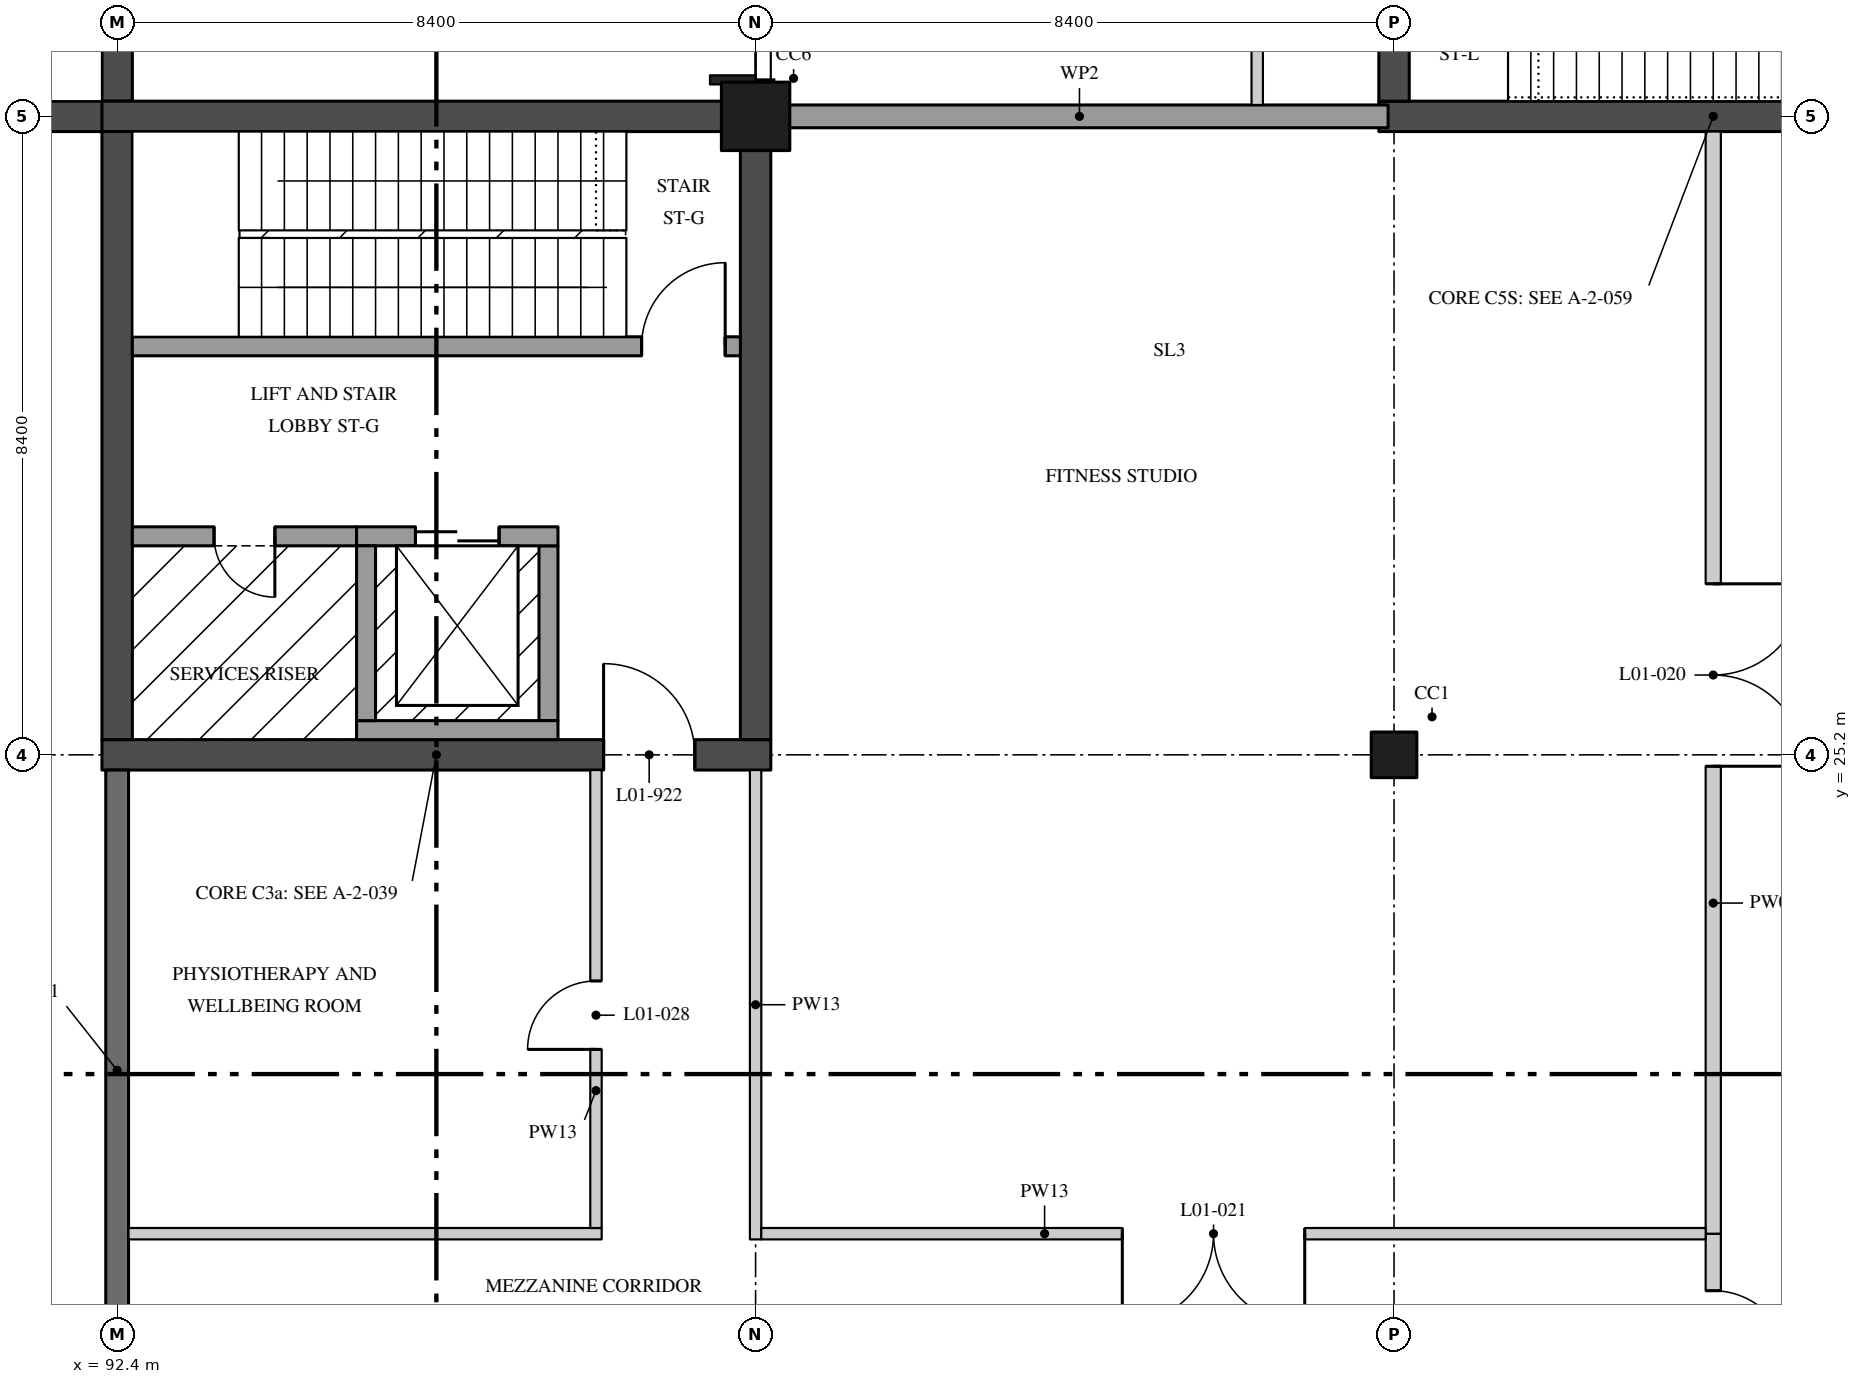
"""IFC4 building model, lengths in metres.
Left out: names, types, materials, properties, quantities, classifications, styles, units other than length and angle.
Written with IfcOpenShell. Run it as: python <this file> out.ifc"""

import sys

from ifc_helpers import new_model, si_unit, direction, frame, frame_2d, origin, origin_2d, place, context, subcontext, project, spatial, polyline, rectangle, outline, extrude, element, fill, save


model = new_model("IFC4")
c1 = context("Model", 3, precision=1e-05, world=origin(), true_north=direction((0.0, 1.0)))
c2 = subcontext(c1, "Body", "Model", "MODEL_VIEW")
j1 = project(units=[si_unit("LENGTHUNIT", "METRE"), si_unit("PLANEANGLEUNIT", "RADIAN")], contexts=[c1])
p1 = place(None, origin())
s1 = spatial("IfcSite", under=j1, at=p1, CompositionType="ELEMENT")
p2 = place(p1, origin())
s2 = spatial("IfcBuilding", under=s1, at=p2, CompositionType="ELEMENT")
p3 = place(p2, frame((0.0, 0.0, 5.4)))
s3 = spatial("IfcBuildingStorey", under=s2, at=p3, CompositionType="ELEMENT", Elevation=5.4)
p4 = place(p3, frame((100.8, 33.6, 3.0), z_axis=(0.0, 0.0, 1.0), x_axis=(1.0, 0.0, 0.0)))
e1 = element("IfcColumn", 1, at=p4, inside=s3, PredefinedType="COLUMN", context=c2, shape_type="SweptSolid", body=[
    extrude(rectangle(XDim=0.9, YDim=0.9, at=origin_2d()), origin(), (0.0, 0.0, 1.0), 1.37),
])
p5 = place(p3, frame((109.2, 25.2, 0.0), z_axis=(0.0, 0.0, 1.0), x_axis=(1.0, 0.0, 0.0)))
e2 = element("IfcColumn", 2, at=p5, inside=s3, PredefinedType="COLUMN", context=c2, shape_type="SweptSolid", body=[
    extrude(rectangle(XDim=0.6, YDim=0.6, at=origin_2d()), origin(), (0.0, 0.0, 1.0), 3.0),
])
p6 = place(p3, frame((83.8, 33.6, 0.0), z_axis=(0.0, 0.0, 1.0), x_axis=(1.0, 0.0, 0.0)))
e3 = element("IfcWall", 3, at=p6, inside=s3, PredefinedType="SHEAR", context=c2, shape_type="SweptSolid", body=[
    extrude(rectangle(XDim=8.8, YDim=0.4, at=frame_2d((4.4, 0.0))), origin(), (0.0, 0.0, 1.0), 4.25),
])
p7 = place(p3, frame((92.4, 33.8, 0.0), z_axis=(0.0, 0.0, 1.0), x_axis=(0.0, 1.0, 0.0)))
e4 = element("IfcWall", 4, at=p7, inside=s3, PredefinedType="SHEAR", context=c2, shape_type="SweptSolid", body=[
    extrude(rectangle(XDim=8.0, YDim=0.4, at=frame_2d((4.0, 0.0))), origin(), (0.0, 0.0, 1.0), 4.25),
])
p8 = place(p3, frame((92.2, 25.2, 0.0), z_axis=(0.0, 0.0, 1.0), x_axis=(1.0, 0.0, 0.0)))
e5 = element("IfcWall", 5, at=p8, inside=s3, PredefinedType="SHEAR", context=c2, shape_type="SweptSolid", body=[
    extrude(rectangle(XDim=8.8, YDim=0.4, at=frame_2d((4.4, 0.0))), origin(), (0.0, 0.0, 1.0), 3.0),
])
p9 = place(p8, frame((6.6, 0.0, 0.0)))
e6 = element("IfcOpeningElement", 6, at=p9, cuts=e5, PredefinedType="OPENING", context=c2, shape_type="SweptSolid", body=[
    extrude(rectangle(XDim=1.2, YDim=2.1, at=frame_2d((0.6, 1.05))), frame((0.0, 0.21, 0.0), z_axis=(0.0, -1.0, 0.0), x_axis=(1.0, 0.0, 0.0)), (0.0, 0.0, 1.0), 0.42),
])
p10 = place(p3, frame((92.2, 33.6, 0.0), z_axis=(0.0, 0.0, 1.0), x_axis=(1.0, 0.0, 0.0)))
e7 = element("IfcWall", 7, at=p10, inside=s3, PredefinedType="SHEAR", context=c2, shape_type="SweptSolid", body=[
    extrude(rectangle(XDim=8.8, YDim=0.4, at=frame_2d((4.4, 0.0))), origin(), (0.0, 0.0, 1.0), 3.0),
])
for number, where, z_axis, x_axis in (
    (8, (92.4, 25.4, 0.0), (0.0, 0.0, 1.0), (0.0, 1.0, 0.0)),
    (9, (100.8, 25.4, 0.0), (0.0, 0.0, 1.0), (0.0, 1.0, 0.0)),
):
    element("IfcWall", number, at=place(p3, frame(where, z_axis=z_axis, x_axis=x_axis)), inside=s3, PredefinedType="SHEAR", context=c2, shape_type="SweptSolid", body=[
        extrude(rectangle(XDim=8.0, YDim=0.4, at=frame_2d((4.0, 0.0))), origin(), (0.0, 0.0, 1.0), 3.0),
    ])
p11 = place(p3, frame((100.6, 30.575, 0.0), z_axis=(0.0, 0.0, 1.0), x_axis=(-1.0, 0.0, 0.0)))
e10 = element("IfcWall", 10, at=p11, inside=s3, PredefinedType="SOLIDWALL", context=c2, shape_type="SweptSolid", body=[
    extrude(rectangle(XDim=8.0, YDim=0.25, at=frame_2d((4.0, 0.0))), origin(), (0.0, 0.0, 1.0), 3.0),
])
p12 = place(p11, frame((0.2, 0.0, 0.0)))
e11 = element("IfcOpeningElement", 11, at=p12, cuts=e10, PredefinedType="OPENING", context=c2, shape_type="SweptSolid", body=[
    extrude(rectangle(XDim=1.1, YDim=2.1, at=frame_2d((0.55, 1.05))), frame((0.0, 0.135, 0.0), z_axis=(0.0, -1.0, 0.0), x_axis=(1.0, 0.0, 0.0)), (0.0, 0.0, 1.0), 0.27),
])
p13 = place(p3, frame((95.55, 28.075, 0.0), z_axis=(0.0, 0.0, 1.0), x_axis=(-1.0, 0.0, 0.0)))
e12 = element("IfcWall", 12, at=p13, inside=s3, PredefinedType="SOLIDWALL", context=c2, shape_type="SweptSolid", body=[
    extrude(rectangle(XDim=2.95, YDim=0.25, at=frame_2d((1.475, 0.0))), origin(), (0.0, 0.0, 1.0), 3.0),
])
p14 = place(p13, frame((1.075, 0.0, 0.0)))
e13 = element("IfcOpeningElement", 13, at=p14, cuts=e12, PredefinedType="OPENING", context=c2, shape_type="SweptSolid", body=[
    extrude(rectangle(XDim=0.8, YDim=2.1, at=frame_2d((0.4, 1.05))), frame((0.0, 0.135, 0.0), z_axis=(0.0, -1.0, 0.0), x_axis=(1.0, 0.0, 0.0)), (0.0, 0.0, 1.0), 0.27),
])
p15 = place(p3, frame((109.0, 33.6, 0.0), z_axis=(0.0, 0.0, 1.0), x_axis=(1.0, 0.0, 0.0)))
e14 = element("IfcWall", 14, at=p15, inside=s3, PredefinedType="SHEAR", context=c2, shape_type="SweptSolid", body=[
    extrude(rectangle(XDim=8.8, YDim=0.4, at=frame_2d((4.4, 0.0))), origin(), (0.0, 0.0, 1.0), 4.37),
])
p16 = place(p3, frame((109.2, 33.8, 0.0), z_axis=(0.0, 0.0, 1.0), x_axis=(0.0, 1.0, 0.0)))
e15 = element("IfcWall", 15, at=p16, inside=s3, PredefinedType="SHEAR", context=c2, shape_type="SweptSolid", body=[
    extrude(rectangle(XDim=8.0, YDim=0.4, at=frame_2d((4.0, 0.0))), origin(), (0.0, 0.0, 1.0), 4.37),
])
p17 = place(p16, frame((3.875, 0.0, 0.0)))
e16 = element("IfcOpeningElement", 16, at=p17, cuts=e15, PredefinedType="OPENING", context=c2, shape_type="SweptSolid", body=[
    extrude(rectangle(XDim=1.2, YDim=2.1, at=frame_2d((0.6, 1.05))), frame((0.0, 0.21, 0.0), z_axis=(0.0, -1.0, 0.0), x_axis=(1.0, 0.0, 0.0)), (0.0, 0.0, 1.0), 0.42),
])
p18 = place(p3, frame((98.075, 25.65, 0.0), z_axis=(0.0, 0.0, 1.0), x_axis=(0.0, 1.0, 0.0)))
e17 = element("IfcWall", 17, at=p18, inside=s3, PredefinedType="SOLIDWALL", context=c2, shape_type="SweptSolid", body=[
    extrude(rectangle(XDim=2.3, YDim=0.25, at=frame_2d((1.15, 0.0))), origin(), (0.0, 0.0, 1.0), 3.0),
])
p19 = place(p3, frame((95.55, 28.075, 0.0), z_axis=(0.0, 0.0, 1.0), x_axis=(1.0, 0.0, 0.0)))
e18 = element("IfcWall", 18, at=p19, inside=s3, PredefinedType="SOLIDWALL", context=c2, shape_type="SweptSolid", body=[
    extrude(rectangle(XDim=2.65, YDim=0.25, at=frame_2d((1.325, 0.0))), origin(), (0.0, 0.0, 1.0), 3.0),
])
p20 = place(p19, frame((0.775, 0.0, 0.0)))
e19 = element("IfcOpeningElement", 19, at=p20, cuts=e18, PredefinedType="OPENING", context=c2, shape_type="SweptSolid", body=[
    extrude(rectangle(XDim=1.1, YDim=2.1, at=frame_2d((0.55, 1.05))), frame((0.0, 0.135, 0.0), z_axis=(0.0, -1.0, 0.0), x_axis=(1.0, 0.0, 0.0)), (0.0, 0.0, 1.0), 0.27),
])
p21 = place(p3, frame((95.55, 25.525, 0.0), z_axis=(0.0, 0.0, 1.0), x_axis=(1.0, 0.0, 0.0)))
e20 = element("IfcWall", 20, at=p21, inside=s3, PredefinedType="SOLIDWALL", context=c2, shape_type="SweptSolid", body=[
    extrude(rectangle(XDim=2.65, YDim=0.25, at=frame_2d((1.325, 0.0))), origin(), (0.0, 0.0, 1.0), 3.0),
])
p22 = place(p3, frame((95.675, 25.65, 0.0), z_axis=(0.0, 0.0, 1.0), x_axis=(0.0, 1.0, 0.0)))
e21 = element("IfcWall", 21, at=p22, inside=s3, PredefinedType="SOLIDWALL", context=c2, shape_type="SweptSolid", body=[
    extrude(rectangle(XDim=2.3, YDim=0.25, at=frame_2d((1.15, 0.0))), origin(), (0.0, 0.0, 1.0), 3.0),
])
p23 = place(p3, frame((113.4, 17.0, 0.0), z_axis=(0.0, 0.0, 1.0), x_axis=(0.0, 1.0, 0.0)))
e22 = element("IfcWall", 22, at=p23, inside=s3, PredefinedType="PARTITIONING", context=c2, shape_type="SweptSolid", body=[
    extrude(rectangle(XDim=1.9, YDim=0.2, at=frame_2d((0.95, 0.0))), origin(), (0.0, 0.0, 1.0), 4.37),
])
p24 = place(p23, frame((0.15, 0.0, 0.0)))
e23 = element("IfcOpeningElement", 23, at=p24, cuts=e22, PredefinedType="OPENING", context=c2, shape_type="SweptSolid", body=[
    extrude(rectangle(XDim=1.0, YDim=2.4, at=frame_2d((0.5, 1.2))), frame((0.0, 0.11, 0.0), z_axis=(0.0, -1.0, 0.0), x_axis=(1.0, 0.0, 0.0)), (0.0, 0.0, 1.0), 0.22),
])
p25 = place(p3, frame((113.4, 18.9, 0.0), z_axis=(0.0, 0.0, 1.0), x_axis=(0.0, 1.0, 0.0)))
e24 = element("IfcWall", 24, at=p25, inside=s3, PredefinedType="PARTITIONING", context=c2, shape_type="SweptSolid", body=[
    extrude(rectangle(XDim=14.5, YDim=0.2, at=frame_2d((7.25, 0.0))), origin(), (0.0, 0.0, 1.0), 4.37),
])
p26 = place(p25, frame((6.15, 0.0, 0.0)))
e25 = element("IfcOpeningElement", 25, at=p26, cuts=e24, PredefinedType="OPENING", context=c2, shape_type="SweptSolid", body=[
    extrude(rectangle(XDim=2.4, YDim=2.7, at=frame_2d((1.2, 1.35))), frame((0.0, 0.11, 0.0), z_axis=(0.0, -1.0, 0.0), x_axis=(1.0, 0.0, 0.0)), (0.0, 0.0, 1.0), 0.22),
])
p27 = place(p3, frame((100.8, 18.825, 0.0), z_axis=(0.0, 0.0, 1.0), x_axis=(0.0, 1.0, 0.0)))
e26 = element("IfcWall", 26, at=p27, inside=s3, PredefinedType="PARTITIONING", context=c2, shape_type="SweptSolid", body=[
    extrude(rectangle(XDim=6.175, YDim=0.15, at=frame_2d((3.087, 0.0))), origin(), (0.0, 0.0, 1.0), 2.975),
])
p28 = place(p3, frame((100.875, 18.9, 0.0), z_axis=(0.0, 0.0, 1.0), x_axis=(1.0, 0.0, 0.0)))
e27 = element("IfcWall", 27, at=p28, inside=s3, PredefinedType="PARTITIONING", context=c2, shape_type="SweptSolid", body=[
    extrude(rectangle(XDim=12.425, YDim=0.15, at=frame_2d((6.212, 0.0))), origin(), (0.0, 0.0, 1.0), 4.37),
])
p29 = place(p28, frame((4.75, 0.0, 0.0)))
e28 = element("IfcOpeningElement", 28, at=p29, cuts=e27, PredefinedType="OPENING", context=c2, shape_type="SweptSolid", body=[
    extrude(rectangle(XDim=2.4, YDim=2.7, at=frame_2d((1.2, 1.35))), frame((0.0, 0.085, 0.0), z_axis=(0.0, -1.0, 0.0), x_axis=(1.0, 0.0, 0.0)), (0.0, 0.0, 1.0), 0.17),
])
p30 = place(p3, frame((92.55, 18.9, 0.0), z_axis=(0.0, 0.0, 1.0), x_axis=(1.0, 0.0, 0.0)))
e29 = element("IfcWall", 29, at=p30, inside=s3, PredefinedType="PARTITIONING", context=c2, shape_type="SweptSolid", body=[
    extrude(rectangle(XDim=6.225, YDim=0.15, at=frame_2d((3.112, 0.0))), origin(), (0.0, 0.0, 1.0), 4.37),
])
p31 = place(p3, frame((98.7, 18.975, 0.0), z_axis=(0.0, 0.0, 1.0), x_axis=(0.0, 1.0, 0.0)))
e30 = element("IfcWall", 30, at=p31, inside=s3, PredefinedType="PARTITIONING", context=c2, shape_type="SweptSolid", body=[
    extrude(rectangle(XDim=6.025, YDim=0.15, at=frame_2d((3.012, 0.0))), origin(), (0.0, 0.0, 1.0), 4.37),
])
p32 = place(p31, frame((2.35, 0.0, 0.0)))
e31 = element("IfcOpeningElement", 31, at=p32, cuts=e30, PredefinedType="OPENING", context=c2, shape_type="SweptSolid", body=[
    extrude(rectangle(XDim=0.9, YDim=2.1, at=frame_2d((0.45, 1.05))), frame((0.0, 0.085, 0.0), z_axis=(0.0, -1.0, 0.0), x_axis=(1.0, 0.0, 0.0)), (0.0, 0.0, 1.0), 0.17),
])
p33 = place(p3, frame((107.4, 33.75, 0.0), z_axis=(0.0, 0.0, 1.0), x_axis=(0.0, 1.0, 0.0)))
e32 = element("IfcWall", 32, at=p33, inside=s3, PredefinedType="PARTITIONING", context=c2, shape_type="SweptSolid", body=[
    extrude(rectangle(XDim=8.02, YDim=0.15, at=frame_2d((4.01, 0.0))), origin(), (0.0, 0.0, 1.0), 4.37),
])
p34 = place(p33, frame((4.25, 0.0, 0.0)))
e33 = element("IfcOpeningElement", 33, at=p34, cuts=e32, PredefinedType="OPENING", context=c2, shape_type="SweptSolid", body=[
    extrude(rectangle(XDim=1.35, YDim=2.1, at=frame_2d((0.675, 1.05))), frame((0.0, 0.085, 0.0), z_axis=(0.0, -1.0, 0.0), x_axis=(1.0, 0.0, 0.0)), (0.0, 0.0, 1.0), 0.17),
])
p35 = place(p3, frame((92.4, 25.0, 0.0), z_axis=(0.0, 0.0, 1.0), x_axis=(0.0, -1.0, 0.0)))
e34 = element("IfcWall", 34, at=p35, inside=s3, PredefinedType="SOLIDWALL", context=c2, shape_type="SweptSolid", body=[
    extrude(rectangle(XDim=7.9, YDim=0.3, at=frame_2d((3.95, 0.0))), origin(), (0.0, 0.0, 1.0), 2.975),
])
p36 = place(p3, frame((109.122, 33.6, 0.0), z_axis=(0.0, 0.0, 1.0), x_axis=(-1.0, 0.0, 0.0)))
e35 = element("IfcWall", 35, at=p36, inside=s3, PredefinedType="SOLIDWALL", context=c2, shape_type="SweptSolid", body=[
    extrude(outline(polyline([(0.0, 0.0), (8.122, 0.0), (8.122, 3.6), (7.872, 3.6), (0.122, 3.6), (0.0, 3.6), (0.0, 0.0)])), frame((0.0, 0.15, 0.0), z_axis=(0.0, -1.0, 0.0), x_axis=(1.0, 0.0, 0.0)), (0.0, 0.0, 1.0), 0.3),
])
p37 = place(p9, origin())
e36 = element("IfcDoor", 36, at=p37, inside=s3, OperationType="SINGLE_SWING_RIGHT", PredefinedType="DOOR", context=c2, shape_type="SweptSolid", body=[
    extrude(rectangle(XDim=1.2, YDim=2.1, at=frame_2d((0.6, 1.05))), frame((0.0, 0.035, 0.0), z_axis=(0.0, -1.0, 0.0), x_axis=(1.0, 0.0, 0.0)), (0.0, 0.0, 1.0), 0.07),
])
fill(e6, e36)
p38 = place(p14, origin())
e37 = element("IfcDoor", 37, at=p38, inside=s3, OperationType="SINGLE_SWING_RIGHT", PredefinedType="DOOR", context=c2, shape_type="SweptSolid", body=[
    extrude(rectangle(XDim=0.8, YDim=2.1, at=frame_2d((0.4, 1.05))), frame((0.0, 0.035, 0.0), z_axis=(0.0, -1.0, 0.0), x_axis=(1.0, 0.0, 0.0)), (0.0, 0.0, 1.0), 0.07),
])
fill(e13, e37)
p39 = place(p12, frame((1.1, 0.0, 0.0), z_axis=(0.0, 0.0, 1.0), x_axis=(-1.0, 0.0, 0.0)))
e38 = element("IfcDoor", 38, at=p39, inside=s3, OperationType="SINGLE_SWING_LEFT", PredefinedType="DOOR", context=c2, shape_type="SweptSolid", body=[
    extrude(rectangle(XDim=1.1, YDim=2.1, at=frame_2d((0.55, 1.05))), frame((0.0, 0.035, 0.0), z_axis=(0.0, -1.0, 0.0), x_axis=(1.0, 0.0, 0.0)), (0.0, 0.0, 1.0), 0.07),
])
fill(e11, e38)
p40 = place(p20, origin())
e39 = element("IfcDoor", 39, at=p40, inside=s3, OperationType="DOUBLE_DOOR_SLIDING", PredefinedType="DOOR", context=c2, shape_type="SweptSolid", body=[
    extrude(rectangle(XDim=1.1, YDim=2.1, at=frame_2d((0.55, 1.05))), frame((0.0, 0.04, 0.0), z_axis=(0.0, -1.0, 0.0), x_axis=(1.0, 0.0, 0.0)), (0.0, 0.0, 1.0), 0.08),
])
fill(e19, e39)
p41 = place(p24, frame((1.0, 0.0, 0.0), z_axis=(0.0, 0.0, 1.0), x_axis=(-1.0, 0.0, 0.0)))
e40 = element("IfcDoor", 40, at=p41, inside=s3, OperationType="SINGLE_SWING_LEFT", PredefinedType="DOOR", context=c2, shape_type="SweptSolid", body=[
    extrude(rectangle(XDim=1.0, YDim=2.4, at=frame_2d((0.5, 1.2))), frame((0.0, 0.03, 0.0), z_axis=(0.0, -1.0, 0.0), x_axis=(1.0, 0.0, 0.0)), (0.0, 0.0, 1.0), 0.06),
])
fill(e23, e40)
p42 = place(p26, frame((2.4, 0.0, 0.0), z_axis=(0.0, 0.0, 1.0), x_axis=(-1.0, 0.0, 0.0)))
e41 = element("IfcDoor", 41, at=p42, inside=s3, OperationType="DOUBLE_DOOR_SINGLE_SWING", PredefinedType="DOOR", context=c2, shape_type="SweptSolid", body=[
    extrude(rectangle(XDim=2.4, YDim=2.7, at=frame_2d((1.2, 1.35))), frame((0.0, 0.03, 0.0), z_axis=(0.0, -1.0, 0.0), x_axis=(1.0, 0.0, 0.0)), (0.0, 0.0, 1.0), 0.06),
])
fill(e25, e41)
p43 = place(p29, frame((2.4, 0.0, 0.0), z_axis=(0.0, 0.0, 1.0), x_axis=(-1.0, 0.0, 0.0)))
e42 = element("IfcDoor", 42, at=p43, inside=s3, OperationType="DOUBLE_DOOR_SINGLE_SWING", PredefinedType="DOOR", context=c2, shape_type="SweptSolid", body=[
    extrude(rectangle(XDim=2.4, YDim=2.7, at=frame_2d((1.2, 1.35))), frame((0.0, 0.025, 0.0), z_axis=(0.0, -1.0, 0.0), x_axis=(1.0, 0.0, 0.0)), (0.0, 0.0, 1.0), 0.05),
])
fill(e28, e42)
p44 = place(p32, origin())
e43 = element("IfcDoor", 43, at=p44, inside=s3, OperationType="SINGLE_SWING_RIGHT", PredefinedType="DOOR", context=c2, shape_type="SweptSolid", body=[
    extrude(rectangle(XDim=0.9, YDim=2.1, at=frame_2d((0.45, 1.05))), frame((0.0, 0.025, 0.0), z_axis=(0.0, -1.0, 0.0), x_axis=(1.0, 0.0, 0.0)), (0.0, 0.0, 1.0), 0.05),
])
fill(e31, e43)
save(model, sys.argv[1])
